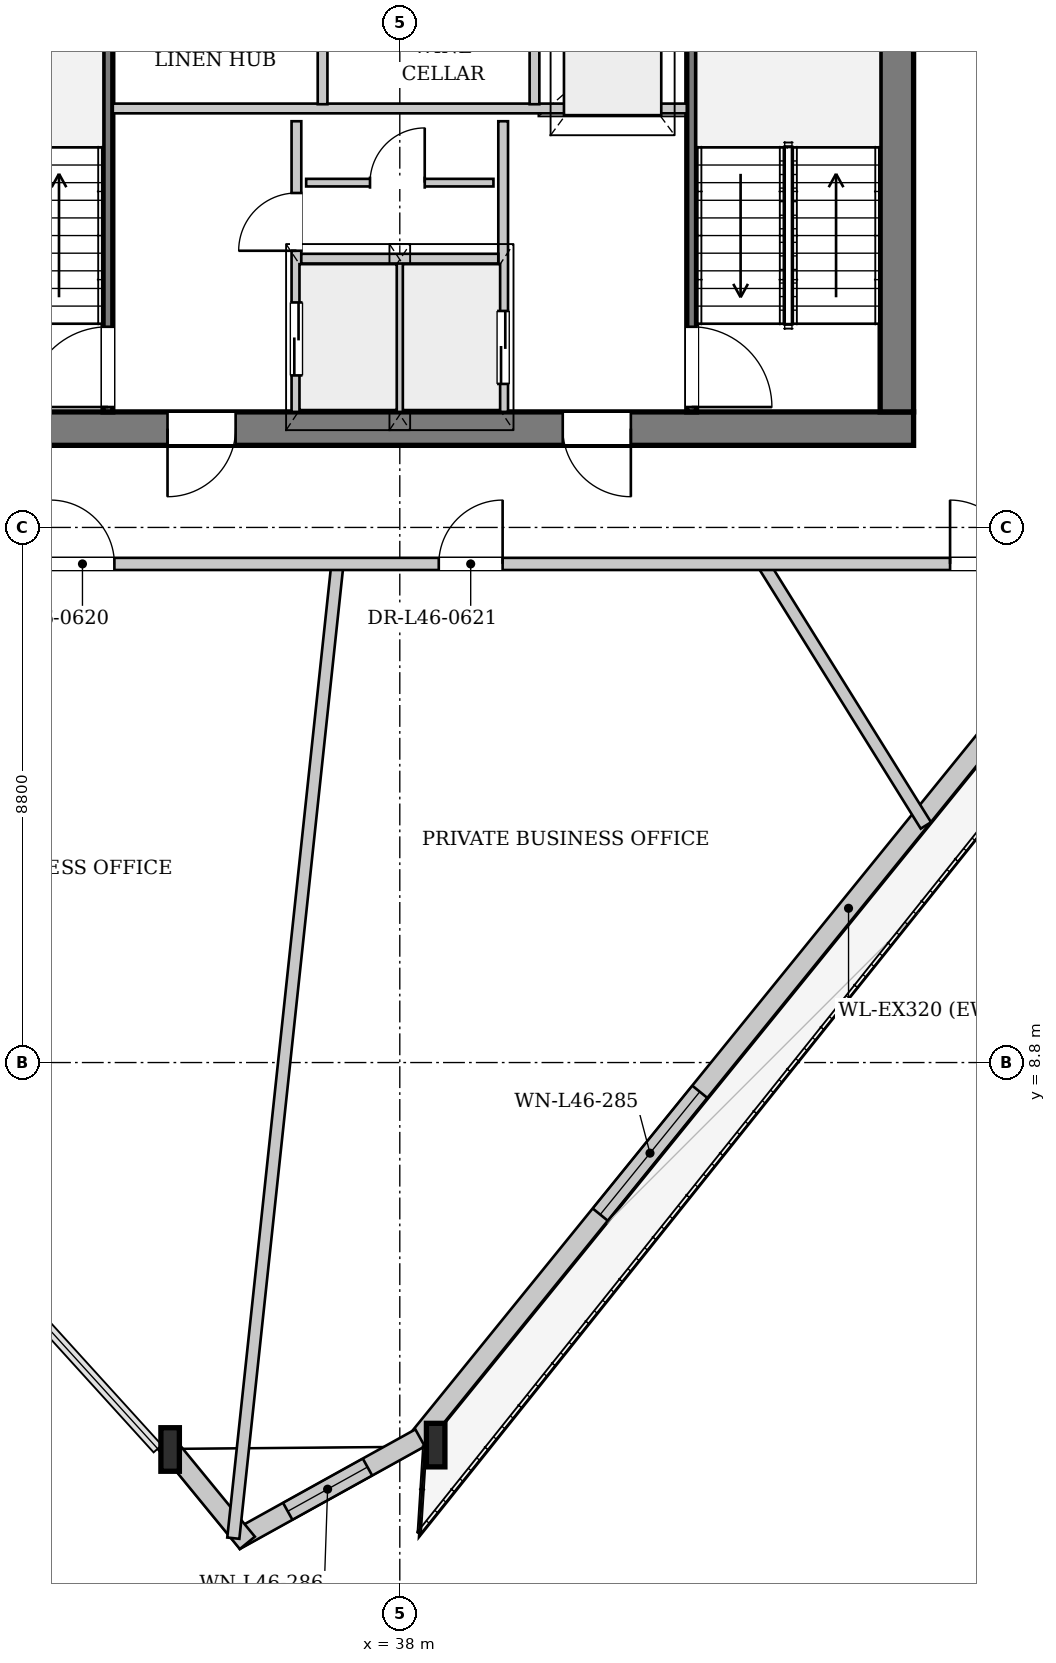
"""IFC4 building model, lengths in metres.
Left out: names, types, materials, properties, quantities, classifications, styles, units other than length and angle.
Written with IfcOpenShell. Run it as: python <this file> out.ifc"""

import sys

from ifc_helpers import new_model, si_unit, direction, frame, frame_2d, origin, origin_2d, place, context, subcontext, project, spatial, rectangle, i_section, extrude, source, transform, mapped, element, fill, save


model = new_model("IFC4")
c1 = context("Model", 3, precision=1e-05, world=origin(), true_north=direction((0.0, 1.0)))
c2 = subcontext(c1, "Body", "Model", "MODEL_VIEW")
j1 = project(units=[si_unit("LENGTHUNIT", "METRE"), si_unit("PLANEANGLEUNIT", "RADIAN")], contexts=[c1])
p1 = place(None, origin())
s1 = spatial("IfcSite", under=j1, at=p1, CompositionType="ELEMENT")
p2 = place(p1, origin())
s2 = spatial("IfcBuilding", under=s1, at=p2, CompositionType="ELEMENT")
p3 = place(p2, frame((0.0, 0.0, 175.0)))
s3 = spatial("IfcBuildingStorey", under=s2, at=p3, CompositionType="ELEMENT", Elevation=175.0)
m1 = source(origin(), c2, "Body", "SweptSolid", [
    extrude(i_section(OverallWidth=0.304, OverallDepth=0.716, WebThickness=0.021, FlangeThickness=0.04, at=origin_2d()), origin(), (0.0, 0.0, 1.0), 3.41),
])
p4 = place(p3, frame((34.018, 2.449, 0.0), z_axis=(0.120214638994, -0.007517889872, 0.992719457804), x_axis=(0.062415293513, 0.998050264834, 0.0)))
e1 = element("IfcColumn", 1, at=p4, inside=s3, PredefinedType="COLUMN", context=c2, shape_type="MappedRepresentation", body=[
    mapped(m1, transform((0.0, 0.0, 0.0), x_axis=(1.0, 0.0, 0.0), y_axis=(0.0, 1.0, 0.0), z_axis=(0.0, 0.0, 1.0), scale=1.0)),
])
m2 = source(origin(), c2, "Body", "SweptSolid", [
    extrude(i_section(OverallWidth=0.304, OverallDepth=0.716, WebThickness=0.021, FlangeThickness=0.04, at=origin_2d()), origin(), (0.0, 0.0, 1.0), 3.404),
])
p5 = place(p3, frame((38.411, 2.488, 0.0), z_axis=(0.105068811283, 0.012335723919, 0.994388442617), x_axis=(-0.116605238745, 0.993178341637, 0.0)))
e2 = element("IfcColumn", 2, at=p5, inside=s3, PredefinedType="COLUMN", context=c2, shape_type="MappedRepresentation", body=[
    mapped(m2, transform((0.0, 0.0, 0.0), x_axis=(1.0, 0.0, 0.0), y_axis=(0.0, 1.0, 0.0), z_axis=(0.0, 0.0, 1.0), scale=1.0)),
])
p6 = place(p3, frame((53.01, 20.748, 0.0), z_axis=(0.0, 0.0, 1.0), x_axis=(-0.629806386055, -0.776752158725, 0.0)))
e3 = element("IfcWall", 3, at=p6, inside=s3, PredefinedType="SOLIDWALL", context=c2, shape_type="SweptSolid", body=[
    extrude(rectangle(XDim=23.378, YDim=0.32, at=frame_2d((11.689, 0.0))), origin(), (0.0, 0.0, 1.0), 2.722),
])
p7 = place(p6, frame((6.731, 0.0, 0.0)))
e4 = element("IfcOpeningElement", 4, at=p7, cuts=e3, PredefinedType="OPENING", context=c2, shape_type="SweptSolid", body=[
    extrude(rectangle(XDim=1.5, YDim=2.3, at=frame_2d((0.75, 1.15))), frame((0.0, 0.17, 0.0), z_axis=(0.0, -1.0, 0.0), x_axis=(1.0, 0.0, 0.0)), (0.0, 0.0, 1.0), 0.34),
])
p8 = place(p6, frame((16.0, 0.0, 0.252)))
e5 = element("IfcOpeningElement", 5, at=p8, cuts=e3, PredefinedType="OPENING", context=c2, shape_type="SweptSolid", body=[
    extrude(rectangle(XDim=2.6, YDim=2.35, at=frame_2d((1.3, 1.175))), frame((0.0, 0.17, 0.0), z_axis=(0.0, -1.0, 0.0), x_axis=(1.0, 0.0, 0.0)), (0.0, 0.0, 1.0), 0.34),
])
p9 = place(p3, frame((38.333, 2.628, 0.0), z_axis=(0.0, 0.0, 1.0), x_axis=(-0.874431894113, -0.485148289246, 0.0)))
e6 = element("IfcWall", 6, at=p9, inside=s3, PredefinedType="SOLIDWALL", context=c2, shape_type="SweptSolid", body=[
    extrude(rectangle(XDim=3.479, YDim=0.32, at=frame_2d((1.739, 0.0))), origin(), (0.0, 0.0, 1.0), 2.722),
])
p10 = place(p9, frame((0.989, 0.0, 0.302)))
e7 = element("IfcOpeningElement", 7, at=p10, cuts=e6, PredefinedType="OPENING", context=c2, shape_type="SweptSolid", body=[
    extrude(rectangle(XDim=1.5, YDim=2.3, at=frame_2d((0.75, 1.15))), frame((0.0, 0.17, 0.0), z_axis=(0.0, -1.0, 0.0), x_axis=(1.0, 0.0, 0.0)), (0.0, 0.0, 1.0), 0.34),
])
p11 = place(p3, frame((35.493, 0.901, 0.0), z_axis=(0.0, 0.0, 1.0), x_axis=(-0.633742690668, 0.773543923785, 0.0)))
e8 = element("IfcWall", 8, at=p11, inside=s3, PredefinedType="SOLIDWALL", context=c2, shape_type="SweptSolid", body=[
    extrude(rectangle(XDim=2.132, YDim=0.32, at=frame_2d((1.066, 0.0))), origin(), (0.0, 0.0, 1.0), 2.722),
])
p12 = place(p3, frame((46.45, 19.225, 0.0), z_axis=(0.0, 0.0, 1.0), x_axis=(-1.0, 0.0, 0.0)))
e9 = element("IfcWall", 9, at=p12, inside=s3, PredefinedType="SHEAR", context=c2, shape_type="SweptSolid", body=[
    extrude(rectangle(XDim=16.9, YDim=0.55, at=frame_2d((8.45, 0.0))), origin(), (0.0, 0.0, 1.0), 3.33),
])
p13 = place(p12, frame((4.65, 0.0, 0.0)))
e10 = element("IfcOpeningElement", 10, at=p13, cuts=e9, PredefinedType="OPENING", context=c2, shape_type="SweptSolid", body=[
    extrude(rectangle(XDim=1.12, YDim=2.25, at=frame_2d((0.56, 1.125))), frame((0.0, 0.285, 0.0), z_axis=(0.0, -1.0, 0.0), x_axis=(1.0, 0.0, 0.0)), (0.0, 0.0, 1.0), 0.57),
])
p14 = place(p12, frame((11.15, 0.0, 0.0)))
e11 = element("IfcOpeningElement", 11, at=p14, cuts=e9, PredefinedType="OPENING", context=c2, shape_type="SweptSolid", body=[
    extrude(rectangle(XDim=1.12, YDim=2.25, at=frame_2d((0.56, 1.125))), frame((0.0, 0.285, 0.0), z_axis=(0.0, -1.0, 0.0), x_axis=(1.0, 0.0, 0.0)), (0.0, 0.0, 1.0), 0.57),
])
p15 = place(p3, frame((46.175, 33.7, 0.0), z_axis=(0.0, 0.0, 1.0), x_axis=(0.0, -1.0, 0.0)))
e12 = element("IfcWall", 12, at=p15, inside=s3, PredefinedType="SHEAR", context=c2, shape_type="SweptSolid", body=[
    extrude(rectangle(XDim=14.2, YDim=0.55, at=frame_2d((7.1, 0.0))), origin(), (0.0, 0.0, 1.0), 3.33),
])
p16 = place(p15, frame((5.18, 0.0, 0.0)))
e13 = element("IfcOpeningElement", 13, at=p16, cuts=e12, PredefinedType="OPENING", context=c2, shape_type="SweptSolid", body=[
    extrude(rectangle(XDim=1.6, YDim=2.2, at=frame_2d((0.8, 1.1))), frame((0.0, 0.285, 0.0), z_axis=(0.0, -1.0, 0.0), x_axis=(1.0, 0.0, 0.0)), (0.0, 0.0, 1.0), 0.57),
])
p17 = place(p15, frame((2.05, 0.0, 0.0)))
e14 = element("IfcOpeningElement", 14, at=p17, cuts=e12, PredefinedType="OPENING", context=c2, shape_type="SweptSolid", body=[
    extrude(rectangle(XDim=0.95, YDim=2.1, at=frame_2d((0.475, 1.05))), frame((0.0, 0.285, 0.0), z_axis=(0.0, -1.0, 0.0), x_axis=(1.0, 0.0, 0.0)), (0.0, 0.0, 1.0), 0.57),
])
p18 = place(p3, frame((33.2, 19.5, 0.0), z_axis=(0.0, 0.0, 1.0), x_axis=(0.0, 1.0, 0.0)))
e15 = element("IfcWall", 15, at=p18, inside=s3, PredefinedType="PARTITIONING", context=c2, shape_type="SweptSolid", body=[
    extrude(rectangle(XDim=7.46, YDim=0.16, at=frame_2d((3.73, 0.0))), origin(), (0.0, 0.0, 1.0), 3.33),
])
p19 = place(p18, frame((0.08, 0.0, 0.0)))
e16 = element("IfcOpeningElement", 16, at=p19, cuts=e15, PredefinedType="OPENING", context=c2, shape_type="SweptSolid", body=[
    extrude(rectangle(XDim=1.32, YDim=2.2, at=frame_2d((0.66, 1.1))), frame((0.0, 0.09, 0.0), z_axis=(0.0, -1.0, 0.0), x_axis=(1.0, 0.0, 0.0)), (0.0, 0.0, 1.0), 0.18),
])
p20 = place(p3, frame((42.8, 26.96, 0.0), z_axis=(0.0, 0.0, 1.0), x_axis=(0.0, -1.0, 0.0)))
e17 = element("IfcWall", 17, at=p20, inside=s3, PredefinedType="PARTITIONING", context=c2, shape_type="SweptSolid", body=[
    extrude(rectangle(XDim=7.46, YDim=0.16, at=frame_2d((3.73, 0.0))), origin(), (0.0, 0.0, 1.0), 3.33),
])
p21 = place(p20, frame((6.06, 0.0, 0.0)))
e18 = element("IfcOpeningElement", 18, at=p21, cuts=e17, PredefinedType="OPENING", context=c2, shape_type="SweptSolid", body=[
    extrude(rectangle(XDim=1.32, YDim=2.2, at=frame_2d((0.66, 1.1))), frame((0.0, 0.09, 0.0), z_axis=(0.0, -1.0, 0.0), x_axis=(1.0, 0.0, 0.0)), (0.0, 0.0, 1.0), 0.18),
])
p22 = place(p3, frame((36.3, 19.5, 0.0), z_axis=(0.0, 0.0, 1.0), x_axis=(0.0, 1.0, 0.0)))
e19 = element("IfcWall", 19, at=p22, inside=s3, PredefinedType="PARTITIONING", context=c2, shape_type="SweptSolid", body=[
    extrude(rectangle(XDim=4.78, YDim=0.16, at=frame_2d((2.39, 0.0))), origin(), (0.0, 0.0, 1.0), 3.33),
])
p23 = place(p22, frame((0.6, 0.0, 0.0)))
e20 = element("IfcOpeningElement", 20, at=p23, cuts=e19, PredefinedType="OPENING", context=c2, shape_type="SweptSolid", body=[
    extrude(rectangle(XDim=1.2, YDim=2.2, at=frame_2d((0.6, 1.1))), frame((0.0, 0.09, 0.0), z_axis=(0.0, -1.0, 0.0), x_axis=(1.0, 0.0, 0.0)), (0.0, 0.0, 1.0), 0.18),
])
p24 = place(p22, frame((2.65, 0.0, 0.0)))
e21 = element("IfcOpeningElement", 21, at=p24, cuts=e19, PredefinedType="OPENING", context=c2, shape_type="SweptSolid", body=[
    extrude(rectangle(XDim=0.95, YDim=2.1, at=frame_2d((0.475, 1.05))), frame((0.0, 0.09, 0.0), z_axis=(0.0, -1.0, 0.0), x_axis=(1.0, 0.0, 0.0)), (0.0, 0.0, 1.0), 0.18),
])
p25 = place(p3, frame((39.7, 24.28, 0.0), z_axis=(0.0, 0.0, 1.0), x_axis=(0.0, -1.0, 0.0)))
e22 = element("IfcWall", 22, at=p25, inside=s3, PredefinedType="PARTITIONING", context=c2, shape_type="SweptSolid", body=[
    extrude(rectangle(XDim=4.78, YDim=0.16, at=frame_2d((2.39, 0.0))), origin(), (0.0, 0.0, 1.0), 3.33),
])
p26 = place(p25, frame((3.12, 0.0, 0.0)))
e23 = element("IfcOpeningElement", 23, at=p26, cuts=e22, PredefinedType="OPENING", context=c2, shape_type="SweptSolid", body=[
    extrude(rectangle(XDim=1.2, YDim=2.2, at=frame_2d((0.6, 1.1))), frame((0.0, 0.09, 0.0), z_axis=(0.0, -1.0, 0.0), x_axis=(1.0, 0.0, 0.0)), (0.0, 0.0, 1.0), 0.18),
])
p27 = place(p3, frame((38.0, 19.5, 0.0), z_axis=(0.0, 0.0, 1.0), x_axis=(0.0, 1.0, 0.0)))
e24 = element("IfcWall", 24, at=p27, inside=s3, PredefinedType="PARTITIONING", context=c2, shape_type="SweptSolid", body=[
    extrude(rectangle(XDim=2.46, YDim=0.125, at=frame_2d((1.23, 0.0))), origin(), (0.0, 0.0, 1.0), 3.33),
])
p28 = place(p3, frame((36.38, 22.02, 0.0), z_axis=(0.0, 0.0, 1.0), x_axis=(1.0, 0.0, 0.0)))
e25 = element("IfcWall", 25, at=p28, inside=s3, PredefinedType="PARTITIONING", context=c2, shape_type="SweptSolid", body=[
    extrude(rectangle(XDim=3.24, YDim=0.16, at=frame_2d((1.62, 0.0))), origin(), (0.0, 0.0, 1.0), 3.33),
])
p29 = place(p3, frame((33.28, 24.49, 0.0), z_axis=(0.0, 0.0, 1.0), x_axis=(1.0, 0.0, 0.0)))
e26 = element("IfcWall", 26, at=p29, inside=s3, PredefinedType="PARTITIONING", context=c2, shape_type="SweptSolid", body=[
    extrude(rectangle(XDim=9.44, YDim=0.16, at=frame_2d((4.72, 0.0))), origin(), (0.0, 0.0, 1.0), 3.33),
])
p30 = place(p3, frame((36.46, 23.27, 0.0), z_axis=(0.0, 0.0, 1.0), x_axis=(1.0, 0.0, 0.0)))
e27 = element("IfcWall", 27, at=p30, inside=s3, PredefinedType="PARTITIONING", context=c2, shape_type="SweptSolid", body=[
    extrude(rectangle(XDim=3.08, YDim=0.125, at=frame_2d((1.54, 0.0))), origin(), (0.0, 0.0, 1.0), 3.33),
])
p31 = place(p30, frame((1.05, 0.0, 0.0)))
e28 = element("IfcOpeningElement", 28, at=p31, cuts=e27, PredefinedType="OPENING", context=c2, shape_type="SweptSolid", body=[
    extrude(rectangle(XDim=0.9, YDim=2.1, at=frame_2d((0.45, 1.05))), frame((0.0, 0.073, 0.0), z_axis=(0.0, -1.0, 0.0), x_axis=(1.0, 0.0, 0.0)), (0.0, 0.0, 1.0), 0.145),
])
for number, where, z_axis, x_axis in (
    (29, (36.73, 24.56, 0.0), (0.0, 0.0, 1.0), (0.0, 1.0, 0.0)),
    (30, (40.215, 24.56, 0.0), (0.0, 0.0, 1.0), (0.0, 1.0, 0.0)),
):
    element("IfcWall", number, at=place(p3, frame(where, z_axis=z_axis, x_axis=x_axis)), inside=s3, PredefinedType="PARTITIONING", context=c2, shape_type="SweptSolid", body=[
        extrude(rectangle(XDim=2.31, YDim=0.16, at=frame_2d((1.155, 0.0))), origin(), (0.0, 0.0, 1.0), 3.33),
    ])
p32 = place(p3, frame((36.974, 17.0, 0.0), z_axis=(0.0, 0.0, 1.0), x_axis=(-0.106274717856, -0.994336806291, 0.0)))
e31 = element("IfcWall", 31, at=p32, inside=s3, PredefinedType="PARTITIONING", context=c2, shape_type="SweptSolid", body=[
    extrude(rectangle(XDim=16.113, YDim=0.2, at=frame_2d((8.057, 0.0))), origin(), (0.0, 0.0, 1.0), 3.33),
])
p33 = place(p3, frame((43.976, 17.0, 0.0), z_axis=(0.0, 0.0, 1.0), x_axis=(0.528425417739, -0.848979727607, 0.0)))
e32 = element("IfcWall", 32, at=p33, inside=s3, PredefinedType="PARTITIONING", context=c2, shape_type="SweptSolid", body=[
    extrude(rectangle(XDim=5.065, YDim=0.2, at=frame_2d((2.533, 0.0))), origin(), (0.0, 0.0, 1.0), 3.33),
])
p34 = place(p3, frame((27.6, 17.0, 0.0), z_axis=(0.0, 0.0, 1.0), x_axis=(1.0, 0.0, 0.0)))
e33 = element("IfcWall", 33, at=p34, inside=s3, PredefinedType="PARTITIONING", context=c2, shape_type="SweptSolid", body=[
    extrude(rectangle(XDim=20.8, YDim=0.2, at=frame_2d((10.4, 0.0))), origin(), (0.0, 0.0, 1.0), 3.33),
])
p35 = place(p34, frame((4.656, 0.0, 0.0)))
e34 = element("IfcOpeningElement", 34, at=p35, cuts=e33, PredefinedType="OPENING", context=c2, shape_type="SweptSolid", body=[
    extrude(rectangle(XDim=1.05, YDim=2.2, at=frame_2d((0.525, 1.1))), frame((0.0, 0.11, 0.0), z_axis=(0.0, -1.0, 0.0), x_axis=(1.0, 0.0, 0.0)), (0.0, 0.0, 1.0), 0.22),
])
p36 = place(p34, frame((11.041, 0.0, 0.0)))
e35 = element("IfcOpeningElement", 35, at=p36, cuts=e33, PredefinedType="OPENING", context=c2, shape_type="SweptSolid", body=[
    extrude(rectangle(XDim=1.05, YDim=2.2, at=frame_2d((0.525, 1.1))), frame((0.0, 0.11, 0.0), z_axis=(0.0, -1.0, 0.0), x_axis=(1.0, 0.0, 0.0)), (0.0, 0.0, 1.0), 0.22),
])
p37 = place(p34, frame((19.45, 0.0, 0.0)))
e36 = element("IfcOpeningElement", 36, at=p37, cuts=e33, PredefinedType="OPENING", context=c2, shape_type="SweptSolid", body=[
    extrude(rectangle(XDim=1.05, YDim=2.2, at=frame_2d((0.525, 1.1))), frame((0.0, 0.11, 0.0), z_axis=(0.0, -1.0, 0.0), x_axis=(1.0, 0.0, 0.0)), (0.0, 0.0, 1.0), 0.22),
])
m3 = source(origin(), c2, "Body", "SweptSolid", [
    extrude(rectangle(XDim=2.6, YDim=2.35, at=frame_2d((1.3, 1.175))), frame((0.0, 0.03, 0.0), z_axis=(0.0, -1.0, 0.0), x_axis=(1.0, 0.0, 0.0)), (0.0, 0.0, 1.0), 0.06),
])
p38 = place(p8, origin())
e37 = element("IfcWindow", 37, at=p38, inside=s3, PartitioningType="SINGLE_PANEL", PredefinedType="WINDOW", context=c2, shape_type="MappedRepresentation", body=[
    mapped(m3, transform((0.0, 0.0, 0.0), x_axis=(1.0, 0.0, 0.0), y_axis=(0.0, 1.0, 0.0), z_axis=(0.0, 0.0, 1.0), scale=1.0)),
])
fill(e5, e37)
m4 = source(origin(), c2, "Body", "SweptSolid", [
    extrude(rectangle(XDim=1.5, YDim=2.3, at=frame_2d((0.75, 1.15))), frame((0.0, 0.03, 0.0), z_axis=(0.0, -1.0, 0.0), x_axis=(1.0, 0.0, 0.0)), (0.0, 0.0, 1.0), 0.06),
])
p39 = place(p10, origin())
e38 = element("IfcWindow", 38, at=p39, inside=s3, PartitioningType="SINGLE_PANEL", PredefinedType="WINDOW", context=c2, shape_type="MappedRepresentation", body=[
    mapped(m4, transform((0.0, 0.0, 0.0), x_axis=(1.0, 0.0, 0.0), y_axis=(0.0, 1.0, 0.0), z_axis=(0.0, 0.0, 1.0), scale=1.0)),
])
fill(e7, e38)
m5 = source(origin(), c2, "Body", "SweptSolid", [
    extrude(rectangle(XDim=1.12, YDim=2.25, at=frame_2d((0.56, 1.125))), frame((0.0, 0.025, 0.0), z_axis=(0.0, -1.0, 0.0), x_axis=(1.0, 0.0, 0.0)), (0.0, 0.0, 1.0), 0.05),
])
p40 = place(p13, origin())
e39 = element("IfcDoor", 39, at=p40, inside=s3, OperationType="SINGLE_SWING_LEFT", PredefinedType="DOOR", context=c2, shape_type="MappedRepresentation", body=[
    mapped(m5, transform((0.0, 0.0, 0.0), x_axis=(1.0, 0.0, 0.0), y_axis=(0.0, 1.0, 0.0), z_axis=(0.0, 0.0, 1.0), scale=1.0)),
])
fill(e10, e39)
p41 = place(p14, origin())
e40 = element("IfcDoor", 40, at=p41, inside=s3, OperationType="SINGLE_SWING_RIGHT", PredefinedType="DOOR", context=c2, shape_type="MappedRepresentation", body=[
    mapped(m5, transform((0.0, 0.0, 0.0), x_axis=(1.0, 0.0, 0.0), y_axis=(0.0, 1.0, 0.0), z_axis=(0.0, 0.0, 1.0), scale=1.0)),
])
fill(e11, e40)
m6 = source(origin(), c2, "Body", "SweptSolid", [
    extrude(rectangle(XDim=1.32, YDim=2.2, at=frame_2d((0.66, 1.1))), frame((0.0, 0.025, 0.0), z_axis=(0.0, -1.0, 0.0), x_axis=(1.0, 0.0, 0.0)), (0.0, 0.0, 1.0), 0.05),
])
p42 = place(p19, origin())
e41 = element("IfcDoor", 41, at=p42, inside=s3, OperationType="SINGLE_SWING_LEFT", PredefinedType="DOOR", context=c2, shape_type="MappedRepresentation", body=[
    mapped(m6, transform((0.0, 0.0, 0.0), x_axis=(1.0, 0.0, 0.0), y_axis=(0.0, 1.0, 0.0), z_axis=(0.0, 0.0, 1.0), scale=1.0)),
])
fill(e16, e41)
p43 = place(p21, origin())
e42 = element("IfcDoor", 42, at=p43, inside=s3, OperationType="SINGLE_SWING_RIGHT", PredefinedType="DOOR", context=c2, shape_type="MappedRepresentation", body=[
    mapped(m6, transform((0.0, 0.0, 0.0), x_axis=(1.0, 0.0, 0.0), y_axis=(0.0, 1.0, 0.0), z_axis=(0.0, 0.0, 1.0), scale=1.0)),
])
fill(e18, e42)
m7 = source(origin(), c2, "Body", "SweptSolid", [
    extrude(rectangle(XDim=1.2, YDim=2.2, at=frame_2d((0.6, 1.1))), frame((0.0, 0.025, 0.0), z_axis=(0.0, -1.0, 0.0), x_axis=(1.0, 0.0, 0.0)), (0.0, 0.0, 1.0), 0.05),
])
p44 = place(p23, origin())
e43 = element("IfcDoor", 43, at=p44, inside=s3, OperationType="DOUBLE_DOOR_SLIDING", PredefinedType="DOOR", context=c2, shape_type="MappedRepresentation", body=[
    mapped(m7, transform((0.0, 0.0, 0.0), x_axis=(1.0, 0.0, 0.0), y_axis=(0.0, 1.0, 0.0), z_axis=(0.0, 0.0, 1.0), scale=1.0)),
])
fill(e20, e43)
m8 = source(origin(), c2, "Body", "SweptSolid", [
    extrude(rectangle(XDim=0.95, YDim=2.1, at=frame_2d((0.475, 1.05))), frame((0.0, 0.025, 0.0), z_axis=(0.0, -1.0, 0.0), x_axis=(1.0, 0.0, 0.0)), (0.0, 0.0, 1.0), 0.05),
])
p45 = place(p24, origin())
e44 = element("IfcDoor", 44, at=p45, inside=s3, OperationType="SINGLE_SWING_LEFT", PredefinedType="DOOR", context=c2, shape_type="MappedRepresentation", body=[
    mapped(m8, transform((0.0, 0.0, 0.0), x_axis=(1.0, 0.0, 0.0), y_axis=(0.0, 1.0, 0.0), z_axis=(0.0, 0.0, 1.0), scale=1.0)),
])
fill(e21, e44)
m9 = source(origin(), c2, "Body", "SweptSolid", [
    extrude(rectangle(XDim=0.9, YDim=2.1, at=frame_2d((0.45, 1.05))), frame((0.0, 0.025, 0.0), z_axis=(0.0, -1.0, 0.0), x_axis=(1.0, 0.0, 0.0)), (0.0, 0.0, 1.0), 0.05),
])
p46 = place(p31, origin())
e45 = element("IfcDoor", 45, at=p46, inside=s3, OperationType="SINGLE_SWING_RIGHT", PredefinedType="DOOR", context=c2, shape_type="MappedRepresentation", body=[
    mapped(m9, transform((0.0, 0.0, 0.0), x_axis=(1.0, 0.0, 0.0), y_axis=(0.0, 1.0, 0.0), z_axis=(0.0, 0.0, 1.0), scale=1.0)),
])
fill(e28, e45)
p47 = place(p26, origin())
e46 = element("IfcDoor", 46, at=p47, inside=s3, OperationType="DOUBLE_DOOR_SLIDING", PredefinedType="DOOR", context=c2, shape_type="MappedRepresentation", body=[
    mapped(m7, transform((0.0, 0.0, 0.0), x_axis=(1.0, 0.0, 0.0), y_axis=(0.0, 1.0, 0.0), z_axis=(0.0, 0.0, 1.0), scale=1.0)),
])
fill(e23, e46)
m10 = source(origin(), c2, "Body", "SweptSolid", [
    extrude(rectangle(XDim=1.05, YDim=2.2, at=frame_2d((0.525, 1.1))), frame((0.0, 0.025, 0.0), z_axis=(0.0, -1.0, 0.0), x_axis=(1.0, 0.0, 0.0)), (0.0, 0.0, 1.0), 0.05),
])
p48 = place(p35, origin())
e47 = element("IfcDoor", 47, at=p48, inside=s3, OperationType="SINGLE_SWING_LEFT", PredefinedType="DOOR", context=c2, shape_type="MappedRepresentation", body=[
    mapped(m10, transform((0.0, 0.0, 0.0), x_axis=(1.0, 0.0, 0.0), y_axis=(0.0, 1.0, 0.0), z_axis=(0.0, 0.0, 1.0), scale=1.0)),
])
fill(e34, e47)
p49 = place(p36, origin())
e48 = element("IfcDoor", 48, at=p49, inside=s3, OperationType="SINGLE_SWING_RIGHT", PredefinedType="DOOR", context=c2, shape_type="MappedRepresentation", body=[
    mapped(m10, transform((0.0, 0.0, 0.0), x_axis=(1.0, 0.0, 0.0), y_axis=(0.0, 1.0, 0.0), z_axis=(0.0, 0.0, 1.0), scale=1.0)),
])
fill(e35, e48)
p50 = place(p37, origin())
e49 = element("IfcDoor", 49, at=p50, inside=s3, OperationType="SINGLE_SWING_LEFT", PredefinedType="DOOR", context=c2, shape_type="MappedRepresentation", body=[
    mapped(m10, transform((0.0, 0.0, 0.0), x_axis=(1.0, 0.0, 0.0), y_axis=(0.0, 1.0, 0.0), z_axis=(0.0, 0.0, 1.0), scale=1.0)),
])
fill(e36, e49)
save(model, sys.argv[1])
